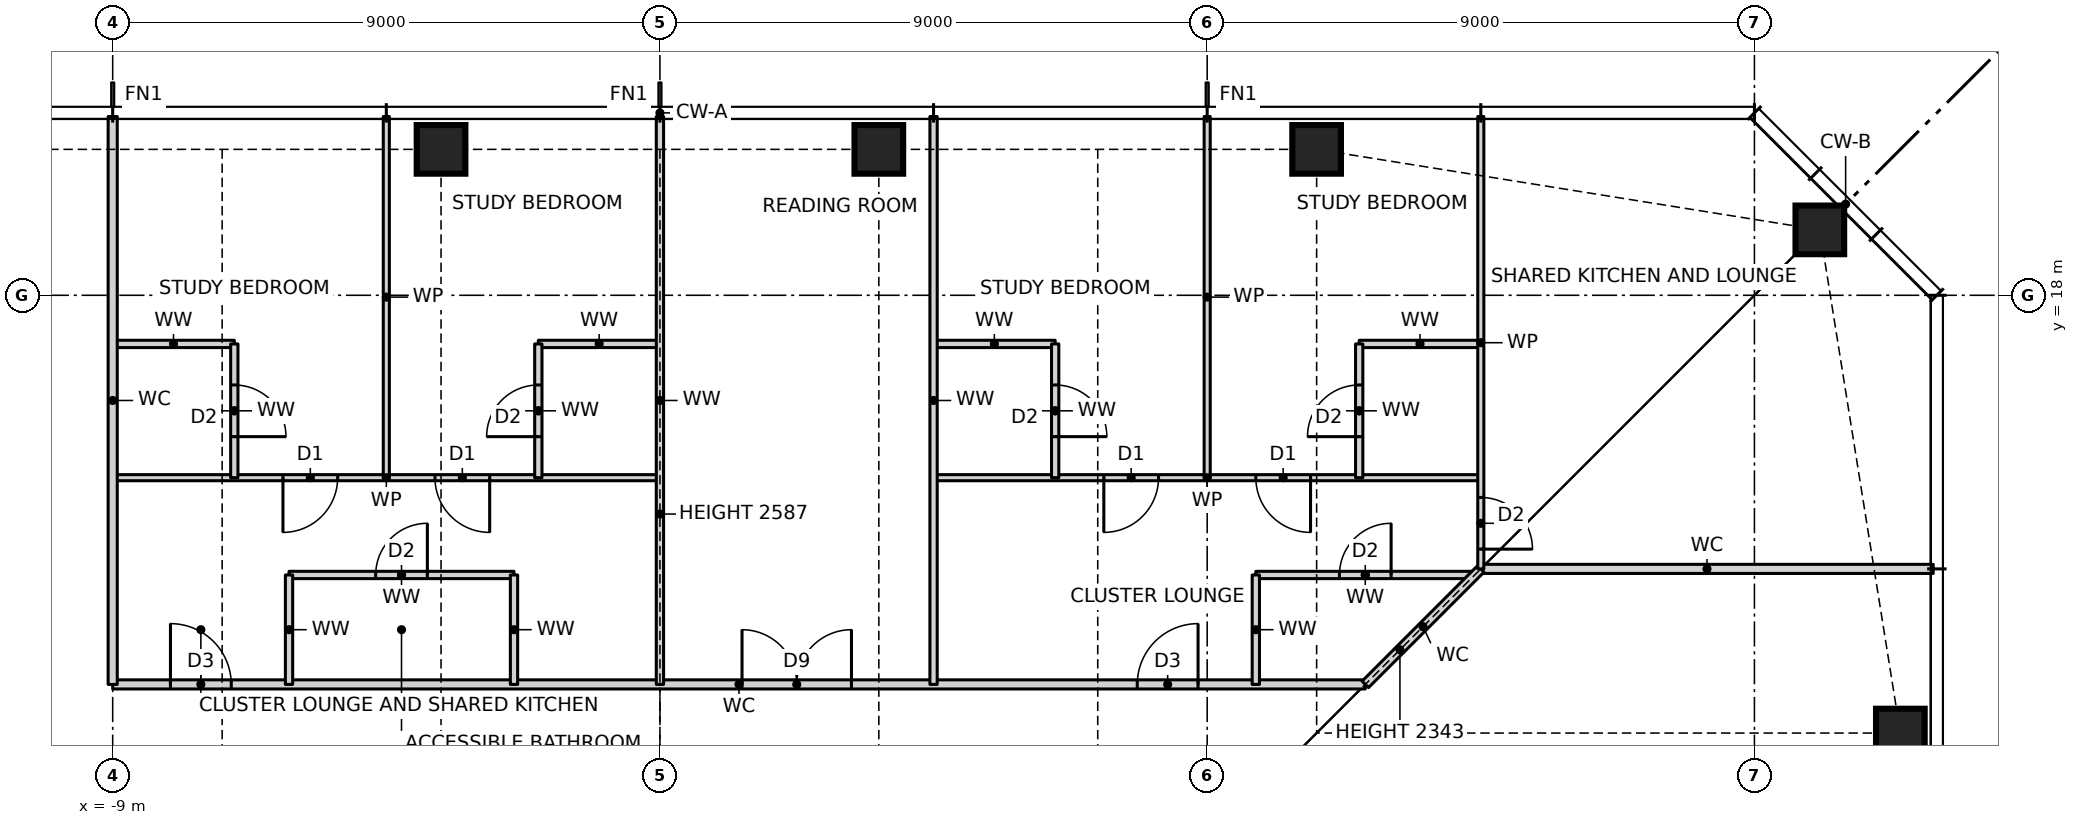
"""IFC4 building model, lengths in metres.
Left out: names, types, materials, properties, quantities, classifications, styles, units other than length and angle.
Written with IfcOpenShell. Run it as: python <this file> out.ifc"""

import sys

from ifc_helpers import new_model, si_unit, direction, frame, frame_2d, origin, origin_2d, place, context, subcontext, project, spatial, rectangle, hollow_rectangle, extrude, element, fill, save


model = new_model("IFC4")
c1 = context("Model", 3, precision=1e-05, world=origin(), true_north=direction((0.0, 1.0)))
c2 = subcontext(c1, "Body", "Model", "MODEL_VIEW")
j1 = project(units=[si_unit("LENGTHUNIT", "METRE"), si_unit("PLANEANGLEUNIT", "RADIAN")], contexts=[c1])
p1 = place(None, origin())
s1 = spatial("IfcSite", under=j1, at=p1, CompositionType="ELEMENT")
p2 = place(p1, origin())
s2 = spatial("IfcBuilding", under=s1, at=p2, CompositionType="ELEMENT")
p3 = place(p2, frame((0.0, 0.0, 112.0)))
s3 = spatial("IfcBuildingStorey", under=s2, at=p3, CompositionType="ELEMENT", Elevation=112.0)
for number, where, z_axis, x_axis in (
    (1, (20.4, 10.8, 0.0), (0.0, 0.0, 1.0), (1.0, 0.0, 0.0)),
    (2, (19.076, 19.076, 0.0), (0.0, 0.0, 1.0), (1.0, 0.0, 0.0)),
    (3, (10.8, 20.4, 0.0), (0.0, 0.0, 1.0), (1.0, 0.0, 0.0)),
    (4, (3.6, 20.4, 0.0), (0.0, 0.0, 1.0), (1.0, 0.0, 0.0)),
    (5, (-3.6, 20.4, 0.0), (0.0, 0.0, 1.0), (1.0, 0.0, 0.0)),
):
    element("IfcColumn", number, at=place(p3, frame(where, z_axis=z_axis, x_axis=x_axis)), inside=s3, PredefinedType="COLUMN", context=c2, shape_type="SweptSolid", body=[
        extrude(hollow_rectangle(XDim=0.8, YDim=0.8, WallThickness=0.07, at=origin_2d()), origin(), (0.0, 0.0, 1.0), 3.5),
    ])
p4 = place(p3, frame((-9.0, 11.6, 0.0), z_axis=(0.0, 0.0, 1.0), x_axis=(1.0, 0.0, 0.0)))
e6 = element("IfcWall", 6, at=p4, inside=s3, PredefinedType="PARTITIONING", context=c2, shape_type="SweptSolid", body=[
    extrude(rectangle(XDim=20.6, YDim=0.15, at=frame_2d((10.3, 0.0))), origin(), (0.0, 0.0, 1.0), 3.27),
])
p5 = place(p4, frame((16.85, 0.0, 0.0)))
e7 = element("IfcOpeningElement", 7, at=p5, cuts=e6, PredefinedType="OPENING", context=c2, shape_type="SweptSolid", body=[
    extrude(rectangle(XDim=1.0, YDim=2.1, at=frame_2d((0.5, 1.05))), frame((0.0, 0.085, 0.0), z_axis=(0.0, -1.0, 0.0), x_axis=(1.0, 0.0, 0.0)), (0.0, 0.0, 1.0), 0.17),
])
p6 = place(p4, frame((10.35, 0.0, 0.0)))
e8 = element("IfcOpeningElement", 8, at=p6, cuts=e6, PredefinedType="OPENING", context=c2, shape_type="SweptSolid", body=[
    extrude(rectangle(XDim=1.8, YDim=2.1, at=frame_2d((0.9, 1.05))), frame((0.0, 0.085, 0.0), z_axis=(0.0, -1.0, 0.0), x_axis=(1.0, 0.0, 0.0)), (0.0, 0.0, 1.0), 0.17),
])
p7 = place(p4, frame((0.95, 0.0, 0.0)))
e9 = element("IfcOpeningElement", 9, at=p7, cuts=e6, PredefinedType="OPENING", context=c2, shape_type="SweptSolid", body=[
    extrude(rectangle(XDim=1.0, YDim=2.1, at=frame_2d((0.5, 1.05))), frame((0.0, 0.085, 0.0), z_axis=(0.0, -1.0, 0.0), x_axis=(1.0, 0.0, 0.0)), (0.0, 0.0, 1.0), 0.17),
])
p8 = place(p3, frame((-6.1, 13.4, 0.0), z_axis=(0.0, 0.0, 1.0), x_axis=(1.0, 0.0, 0.0)))
e10 = element("IfcWall", 10, at=p8, inside=s3, PredefinedType="PARTITIONING", context=c2, shape_type="SweptSolid", body=[
    extrude(rectangle(XDim=3.7, YDim=0.12, at=frame_2d((1.85, 0.0))), origin(), (0.0, 0.0, 1.0), 3.27),
])
p9 = place(p8, frame((1.425, 0.0, 0.0)))
e11 = element("IfcOpeningElement", 11, at=p9, cuts=e10, PredefinedType="OPENING", context=c2, shape_type="SweptSolid", body=[
    extrude(rectangle(XDim=0.85, YDim=2.1, at=frame_2d((0.425, 1.05))), frame((0.0, 0.07, 0.0), z_axis=(0.0, -1.0, 0.0), x_axis=(1.0, 0.0, 0.0)), (0.0, 0.0, 1.0), 0.14),
])
p10 = place(p3, frame((9.8, 13.4, 0.0), z_axis=(0.0, 0.0, 1.0), x_axis=(1.0, 0.0, 0.0)))
e12 = element("IfcWall", 12, at=p10, inside=s3, PredefinedType="PARTITIONING", context=c2, shape_type="SweptSolid", body=[
    extrude(rectangle(XDim=3.6, YDim=0.12, at=frame_2d((1.8, 0.0))), origin(), (0.0, 0.0, 1.0), 3.27),
])
p11 = place(p10, frame((1.375, 0.0, 0.0)))
e13 = element("IfcOpeningElement", 13, at=p11, cuts=e12, PredefinedType="OPENING", context=c2, shape_type="SweptSolid", body=[
    extrude(rectangle(XDim=0.85, YDim=2.1, at=frame_2d((0.425, 1.05))), frame((0.0, 0.07, 0.0), z_axis=(0.0, -1.0, 0.0), x_axis=(1.0, 0.0, 0.0)), (0.0, 0.0, 1.0), 0.14),
])
p12 = place(p3, frame((13.5, 13.5, 0.0), z_axis=(0.0, 0.0, 1.0), x_axis=(1.0, 0.0, 0.0)))
e14 = element("IfcWall", 14, at=p12, inside=s3, PredefinedType="PARTITIONING", context=c2, shape_type="SweptSolid", body=[
    extrude(rectangle(XDim=7.44, YDim=0.15, at=frame_2d((3.72, 0.0))), origin(), (0.0, 0.0, 1.0), 3.27),
])
p13 = place(p3, frame((-9.0, 15.0, 0.0), z_axis=(0.0, 0.0, 1.0), x_axis=(1.0, 0.0, 0.0)))
e15 = element("IfcWall", 15, at=p13, inside=s3, PredefinedType="PARTITIONING", context=c2, shape_type="SweptSolid", body=[
    extrude(rectangle(XDim=9.0, YDim=0.1, at=frame_2d((4.5, 0.0))), origin(), (0.0, 0.0, 1.0), 3.27),
])
p14 = place(p13, frame((5.3, 0.0, 0.0)))
e16 = element("IfcOpeningElement", 16, at=p14, cuts=e15, PredefinedType="OPENING", context=c2, shape_type="SweptSolid", body=[
    extrude(rectangle(XDim=0.9, YDim=2.1, at=frame_2d((0.45, 1.05))), frame((0.0, 0.06, 0.0), z_axis=(0.0, -1.0, 0.0), x_axis=(1.0, 0.0, 0.0)), (0.0, 0.0, 1.0), 0.12),
])
p15 = place(p13, frame((2.8, 0.0, 0.0)))
e17 = element("IfcOpeningElement", 17, at=p15, cuts=e15, PredefinedType="OPENING", context=c2, shape_type="SweptSolid", body=[
    extrude(rectangle(XDim=0.9, YDim=2.1, at=frame_2d((0.45, 1.05))), frame((0.0, 0.06, 0.0), z_axis=(0.0, -1.0, 0.0), x_axis=(1.0, 0.0, 0.0)), (0.0, 0.0, 1.0), 0.12),
])
p16 = place(p3, frame((4.5, 15.0, 0.0), z_axis=(0.0, 0.0, 1.0), x_axis=(1.0, 0.0, 0.0)))
e18 = element("IfcWall", 18, at=p16, inside=s3, PredefinedType="PARTITIONING", context=c2, shape_type="SweptSolid", body=[
    extrude(rectangle(XDim=9.0, YDim=0.1, at=frame_2d((4.5, 0.0))), origin(), (0.0, 0.0, 1.0), 3.27),
])
p17 = place(p16, frame((5.3, 0.0, 0.0)))
e19 = element("IfcOpeningElement", 19, at=p17, cuts=e18, PredefinedType="OPENING", context=c2, shape_type="SweptSolid", body=[
    extrude(rectangle(XDim=0.9, YDim=2.1, at=frame_2d((0.45, 1.05))), frame((0.0, 0.06, 0.0), z_axis=(0.0, -1.0, 0.0), x_axis=(1.0, 0.0, 0.0)), (0.0, 0.0, 1.0), 0.12),
])
p18 = place(p16, frame((2.8, 0.0, 0.0)))
e20 = element("IfcOpeningElement", 20, at=p18, cuts=e18, PredefinedType="OPENING", context=c2, shape_type="SweptSolid", body=[
    extrude(rectangle(XDim=0.9, YDim=2.1, at=frame_2d((0.45, 1.05))), frame((0.0, 0.06, 0.0), z_axis=(0.0, -1.0, 0.0), x_axis=(1.0, 0.0, 0.0)), (0.0, 0.0, 1.0), 0.12),
])
for number, where, z_axis, x_axis in (
    (21, (-9.0, 17.2, 0.0), (0.0, 0.0, 1.0), (1.0, 0.0, 0.0)),
    (22, (-2.0, 17.2, 0.0), (0.0, 0.0, 1.0), (1.0, 0.0, 0.0)),
    (23, (4.5, 17.2, 0.0), (0.0, 0.0, 1.0), (1.0, 0.0, 0.0)),
    (24, (11.5, 17.2, 0.0), (0.0, 0.0, 1.0), (1.0, 0.0, 0.0)),
):
    element("IfcWall", number, at=place(p3, frame(where, z_axis=z_axis, x_axis=x_axis)), inside=s3, PredefinedType="PARTITIONING", context=c2, shape_type="SweptSolid", body=[
        extrude(rectangle(XDim=2.0, YDim=0.12, at=frame_2d((1.0, 0.0))), origin(), (0.0, 0.0, 1.0), 3.27),
    ])
p19 = place(p3, frame((11.6, 11.6, 0.0), z_axis=(0.0, 0.0, 1.0), x_axis=(0.707106781187, 0.707106781187, 0.0)))
e25 = element("IfcWall", 25, at=p19, inside=s3, PredefinedType="PARTITIONING", context=c2, shape_type="SweptSolid", body=[
    extrude(rectangle(XDim=2.687, YDim=0.15, at=frame_2d((1.343, 0.0))), origin(), (0.0, 0.0, 1.0), 2.343),
])
p20 = place(p3, frame((13.5, 13.5, 0.0), z_axis=(0.0, 0.0, 1.0), x_axis=(0.0, 1.0, 0.0)))
e26 = element("IfcWall", 26, at=p20, inside=s3, PredefinedType="PARTITIONING", context=c2, shape_type="SweptSolid", body=[
    extrude(rectangle(XDim=7.44, YDim=0.1, at=frame_2d((3.72, 0.0))), origin(), (0.0, 0.0, 1.0), 3.27),
])
p21 = place(p20, frame((0.325, 0.0, 0.0)))
e27 = element("IfcOpeningElement", 27, at=p21, cuts=e26, PredefinedType="OPENING", context=c2, shape_type="SweptSolid", body=[
    extrude(rectangle(XDim=0.85, YDim=2.1, at=frame_2d((0.425, 1.05))), frame((0.0, 0.06, 0.0), z_axis=(0.0, -1.0, 0.0), x_axis=(1.0, 0.0, 0.0)), (0.0, 0.0, 1.0), 0.12),
])
p22 = place(p3, frame((11.5, 15.0, 0.0), z_axis=(0.0, 0.0, 1.0), x_axis=(0.0, 1.0, 0.0)))
e28 = element("IfcWall", 28, at=p22, inside=s3, PredefinedType="PARTITIONING", context=c2, shape_type="SweptSolid", body=[
    extrude(rectangle(XDim=2.2, YDim=0.12, at=frame_2d((1.1, 0.0))), origin(), (0.0, 0.0, 1.0), 3.27),
])
p23 = place(p22, frame((0.675, 0.0, 0.0)))
e29 = element("IfcOpeningElement", 29, at=p23, cuts=e28, PredefinedType="OPENING", context=c2, shape_type="SweptSolid", body=[
    extrude(rectangle(XDim=0.85, YDim=2.1, at=frame_2d((0.425, 1.05))), frame((0.0, 0.07, 0.0), z_axis=(0.0, -1.0, 0.0), x_axis=(1.0, 0.0, 0.0)), (0.0, 0.0, 1.0), 0.14),
])
p24 = place(p3, frame((9.8, 11.6, 0.0), z_axis=(0.0, 0.0, 1.0), x_axis=(0.0, 1.0, 0.0)))
e30 = element("IfcWall", 30, at=p24, inside=s3, PredefinedType="PARTITIONING", context=c2, shape_type="SweptSolid", body=[
    extrude(rectangle(XDim=1.8, YDim=0.12, at=frame_2d((0.9, 0.0))), origin(), (0.0, 0.0, 1.0), 3.27),
])
p25 = place(p3, frame((9.0, 15.0, 0.0), z_axis=(0.0, 0.0, 1.0), x_axis=(0.0, 1.0, 0.0)))
e31 = element("IfcWall", 31, at=p25, inside=s3, PredefinedType="PARTITIONING", context=c2, shape_type="SweptSolid", body=[
    extrude(rectangle(XDim=5.94, YDim=0.1, at=frame_2d((2.97, 0.0))), origin(), (0.0, 0.0, 1.0), 3.27),
])
p26 = place(p3, frame((6.5, 15.0, 0.0), z_axis=(0.0, 0.0, 1.0), x_axis=(0.0, 1.0, 0.0)))
e32 = element("IfcWall", 32, at=p26, inside=s3, PredefinedType="PARTITIONING", context=c2, shape_type="SweptSolid", body=[
    extrude(rectangle(XDim=2.2, YDim=0.12, at=frame_2d((1.1, 0.0))), origin(), (0.0, 0.0, 1.0), 3.27),
])
p27 = place(p26, frame((0.675, 0.0, 0.0)))
e33 = element("IfcOpeningElement", 33, at=p27, cuts=e32, PredefinedType="OPENING", context=c2, shape_type="SweptSolid", body=[
    extrude(rectangle(XDim=0.85, YDim=2.1, at=frame_2d((0.425, 1.05))), frame((0.0, 0.07, 0.0), z_axis=(0.0, -1.0, 0.0), x_axis=(1.0, 0.0, 0.0)), (0.0, 0.0, 1.0), 0.14),
])
p28 = place(p3, frame((4.5, 11.6, 0.0), z_axis=(0.0, 0.0, 1.0), x_axis=(0.0, 1.0, 0.0)))
e34 = element("IfcWall", 34, at=p28, inside=s3, PredefinedType="PARTITIONING", context=c2, shape_type="SweptSolid", body=[
    extrude(rectangle(XDim=9.34, YDim=0.12, at=frame_2d((4.67, 0.0))), origin(), (0.0, 0.0, 1.0), 3.27),
])
p29 = place(p3, frame((0.0, 11.6, 0.0), z_axis=(0.0, 0.0, 1.0), x_axis=(0.0, 1.0, 0.0)))
e35 = element("IfcWall", 35, at=p29, inside=s3, PredefinedType="PARTITIONING", context=c2, shape_type="SweptSolid", body=[
    extrude(rectangle(XDim=9.34, YDim=0.12, at=frame_2d((4.67, 0.0))), origin(), (0.0, 0.0, 1.0), 2.587),
])
p30 = place(p3, frame((-2.0, 15.0, 0.0), z_axis=(0.0, 0.0, 1.0), x_axis=(0.0, 1.0, 0.0)))
e36 = element("IfcWall", 36, at=p30, inside=s3, PredefinedType="PARTITIONING", context=c2, shape_type="SweptSolid", body=[
    extrude(rectangle(XDim=2.2, YDim=0.12, at=frame_2d((1.1, 0.0))), origin(), (0.0, 0.0, 1.0), 3.27),
])
p31 = place(p30, frame((0.675, 0.0, 0.0)))
e37 = element("IfcOpeningElement", 37, at=p31, cuts=e36, PredefinedType="OPENING", context=c2, shape_type="SweptSolid", body=[
    extrude(rectangle(XDim=0.85, YDim=2.1, at=frame_2d((0.425, 1.05))), frame((0.0, 0.07, 0.0), z_axis=(0.0, -1.0, 0.0), x_axis=(1.0, 0.0, 0.0)), (0.0, 0.0, 1.0), 0.14),
])
p32 = place(p3, frame((-2.4, 11.6, 0.0), z_axis=(0.0, 0.0, 1.0), x_axis=(0.0, 1.0, 0.0)))
e38 = element("IfcWall", 38, at=p32, inside=s3, PredefinedType="PARTITIONING", context=c2, shape_type="SweptSolid", body=[
    extrude(rectangle(XDim=1.8, YDim=0.12, at=frame_2d((0.9, 0.0))), origin(), (0.0, 0.0, 1.0), 3.27),
])
p33 = place(p3, frame((-4.5, 15.0, 0.0), z_axis=(0.0, 0.0, 1.0), x_axis=(0.0, 1.0, 0.0)))
e39 = element("IfcWall", 39, at=p33, inside=s3, PredefinedType="PARTITIONING", context=c2, shape_type="SweptSolid", body=[
    extrude(rectangle(XDim=5.94, YDim=0.1, at=frame_2d((2.97, 0.0))), origin(), (0.0, 0.0, 1.0), 3.27),
])
p34 = place(p3, frame((-6.1, 11.6, 0.0), z_axis=(0.0, 0.0, 1.0), x_axis=(0.0, 1.0, 0.0)))
e40 = element("IfcWall", 40, at=p34, inside=s3, PredefinedType="PARTITIONING", context=c2, shape_type="SweptSolid", body=[
    extrude(rectangle(XDim=1.8, YDim=0.12, at=frame_2d((0.9, 0.0))), origin(), (0.0, 0.0, 1.0), 3.27),
])
p35 = place(p3, frame((-7.0, 15.0, 0.0), z_axis=(0.0, 0.0, 1.0), x_axis=(0.0, 1.0, 0.0)))
e41 = element("IfcWall", 41, at=p35, inside=s3, PredefinedType="PARTITIONING", context=c2, shape_type="SweptSolid", body=[
    extrude(rectangle(XDim=2.2, YDim=0.12, at=frame_2d((1.1, 0.0))), origin(), (0.0, 0.0, 1.0), 3.27),
])
p36 = place(p35, frame((0.675, 0.0, 0.0)))
e42 = element("IfcOpeningElement", 42, at=p36, cuts=e41, PredefinedType="OPENING", context=c2, shape_type="SweptSolid", body=[
    extrude(rectangle(XDim=0.85, YDim=2.1, at=frame_2d((0.425, 1.05))), frame((0.0, 0.07, 0.0), z_axis=(0.0, -1.0, 0.0), x_axis=(1.0, 0.0, 0.0)), (0.0, 0.0, 1.0), 0.14),
])
p37 = place(p3, frame((-9.0, 11.6, 0.0), z_axis=(0.0, 0.0, 1.0), x_axis=(0.0, 1.0, 0.0)))
e43 = element("IfcWall", 43, at=p37, inside=s3, PredefinedType="PARTITIONING", context=c2, shape_type="SweptSolid", body=[
    extrude(rectangle(XDim=9.34, YDim=0.15, at=frame_2d((4.67, 0.0))), origin(), (0.0, 0.0, 1.0), 3.27),
])
p38 = place(p23, origin())
e44 = element("IfcDoor", 44, at=p38, inside=s3, OperationType="SINGLE_SWING_LEFT", PredefinedType="DOOR", context=c2, shape_type="SweptSolid", body=[
    extrude(rectangle(XDim=0.85, YDim=2.1, at=frame_2d((0.425, 1.05))), frame((0.0, 0.025, 0.0), z_axis=(0.0, -1.0, 0.0), x_axis=(1.0, 0.0, 0.0)), (0.0, 0.0, 1.0), 0.05),
])
fill(e29, e44)
p39 = place(p17, frame((0.9, 0.0, 0.0), z_axis=(0.0, 0.0, 1.0), x_axis=(-1.0, 0.0, 0.0)))
e45 = element("IfcDoor", 45, at=p39, inside=s3, OperationType="SINGLE_SWING_LEFT", PredefinedType="DOOR", context=c2, shape_type="SweptSolid", body=[
    extrude(rectangle(XDim=0.9, YDim=2.1, at=frame_2d((0.45, 1.05))), frame((0.0, 0.025, 0.0), z_axis=(0.0, -1.0, 0.0), x_axis=(1.0, 0.0, 0.0)), (0.0, 0.0, 1.0), 0.05),
])
fill(e19, e45)
p40 = place(p27, frame((0.85, 0.0, 0.0), z_axis=(0.0, 0.0, 1.0), x_axis=(-1.0, 0.0, 0.0)))
e46 = element("IfcDoor", 46, at=p40, inside=s3, OperationType="SINGLE_SWING_RIGHT", PredefinedType="DOOR", context=c2, shape_type="SweptSolid", body=[
    extrude(rectangle(XDim=0.85, YDim=2.1, at=frame_2d((0.425, 1.05))), frame((0.0, 0.025, 0.0), z_axis=(0.0, -1.0, 0.0), x_axis=(1.0, 0.0, 0.0)), (0.0, 0.0, 1.0), 0.05),
])
fill(e33, e46)
p41 = place(p18, frame((0.9, 0.0, 0.0), z_axis=(0.0, 0.0, 1.0), x_axis=(-1.0, 0.0, 0.0)))
e47 = element("IfcDoor", 47, at=p41, inside=s3, OperationType="SINGLE_SWING_RIGHT", PredefinedType="DOOR", context=c2, shape_type="SweptSolid", body=[
    extrude(rectangle(XDim=0.9, YDim=2.1, at=frame_2d((0.45, 1.05))), frame((0.0, 0.025, 0.0), z_axis=(0.0, -1.0, 0.0), x_axis=(1.0, 0.0, 0.0)), (0.0, 0.0, 1.0), 0.05),
])
fill(e20, e47)
p42 = place(p5, origin())
e48 = element("IfcDoor", 48, at=p42, inside=s3, OperationType="SINGLE_SWING_RIGHT", PredefinedType="DOOR", context=c2, shape_type="SweptSolid", body=[
    extrude(rectangle(XDim=1.0, YDim=2.1, at=frame_2d((0.5, 1.05))), frame((0.0, 0.025, 0.0), z_axis=(0.0, -1.0, 0.0), x_axis=(1.0, 0.0, 0.0)), (0.0, 0.0, 1.0), 0.05),
])
fill(e7, e48)
p43 = place(p11, origin())
e49 = element("IfcDoor", 49, at=p43, inside=s3, OperationType="SINGLE_SWING_RIGHT", PredefinedType="DOOR", context=c2, shape_type="SweptSolid", body=[
    extrude(rectangle(XDim=0.85, YDim=2.1, at=frame_2d((0.425, 1.05))), frame((0.0, 0.025, 0.0), z_axis=(0.0, -1.0, 0.0), x_axis=(1.0, 0.0, 0.0)), (0.0, 0.0, 1.0), 0.05),
])
fill(e13, e49)
p44 = place(p6, origin())
e50 = element("IfcDoor", 50, at=p44, inside=s3, OperationType="DOUBLE_DOOR_SINGLE_SWING", PredefinedType="DOOR", context=c2, shape_type="SweptSolid", body=[
    extrude(rectangle(XDim=1.8, YDim=2.1, at=frame_2d((0.9, 1.05))), frame((0.0, 0.025, 0.0), z_axis=(0.0, -1.0, 0.0), x_axis=(1.0, 0.0, 0.0)), (0.0, 0.0, 1.0), 0.05),
])
fill(e8, e50)
p45 = place(p31, origin())
e51 = element("IfcDoor", 51, at=p45, inside=s3, OperationType="SINGLE_SWING_LEFT", PredefinedType="DOOR", context=c2, shape_type="SweptSolid", body=[
    extrude(rectangle(XDim=0.85, YDim=2.1, at=frame_2d((0.425, 1.05))), frame((0.0, 0.025, 0.0), z_axis=(0.0, -1.0, 0.0), x_axis=(1.0, 0.0, 0.0)), (0.0, 0.0, 1.0), 0.05),
])
fill(e37, e51)
p46 = place(p14, frame((0.9, 0.0, 0.0), z_axis=(0.0, 0.0, 1.0), x_axis=(-1.0, 0.0, 0.0)))
e52 = element("IfcDoor", 52, at=p46, inside=s3, OperationType="SINGLE_SWING_LEFT", PredefinedType="DOOR", context=c2, shape_type="SweptSolid", body=[
    extrude(rectangle(XDim=0.9, YDim=2.1, at=frame_2d((0.45, 1.05))), frame((0.0, 0.025, 0.0), z_axis=(0.0, -1.0, 0.0), x_axis=(1.0, 0.0, 0.0)), (0.0, 0.0, 1.0), 0.05),
])
fill(e16, e52)
p47 = place(p36, frame((0.85, 0.0, 0.0), z_axis=(0.0, 0.0, 1.0), x_axis=(-1.0, 0.0, 0.0)))
e53 = element("IfcDoor", 53, at=p47, inside=s3, OperationType="SINGLE_SWING_RIGHT", PredefinedType="DOOR", context=c2, shape_type="SweptSolid", body=[
    extrude(rectangle(XDim=0.85, YDim=2.1, at=frame_2d((0.425, 1.05))), frame((0.0, 0.025, 0.0), z_axis=(0.0, -1.0, 0.0), x_axis=(1.0, 0.0, 0.0)), (0.0, 0.0, 1.0), 0.05),
])
fill(e42, e53)
p48 = place(p15, frame((0.9, 0.0, 0.0), z_axis=(0.0, 0.0, 1.0), x_axis=(-1.0, 0.0, 0.0)))
e54 = element("IfcDoor", 54, at=p48, inside=s3, OperationType="SINGLE_SWING_RIGHT", PredefinedType="DOOR", context=c2, shape_type="SweptSolid", body=[
    extrude(rectangle(XDim=0.9, YDim=2.1, at=frame_2d((0.45, 1.05))), frame((0.0, 0.025, 0.0), z_axis=(0.0, -1.0, 0.0), x_axis=(1.0, 0.0, 0.0)), (0.0, 0.0, 1.0), 0.05),
])
fill(e17, e54)
p49 = place(p7, origin())
e55 = element("IfcDoor", 55, at=p49, inside=s3, OperationType="SINGLE_SWING_LEFT", PredefinedType="DOOR", context=c2, shape_type="SweptSolid", body=[
    extrude(rectangle(XDim=1.0, YDim=2.1, at=frame_2d((0.5, 1.05))), frame((0.0, 0.025, 0.0), z_axis=(0.0, -1.0, 0.0), x_axis=(1.0, 0.0, 0.0)), (0.0, 0.0, 1.0), 0.05),
])
fill(e9, e55)
p50 = place(p9, origin())
e56 = element("IfcDoor", 56, at=p50, inside=s3, OperationType="SINGLE_SWING_RIGHT", PredefinedType="DOOR", context=c2, shape_type="SweptSolid", body=[
    extrude(rectangle(XDim=0.85, YDim=2.1, at=frame_2d((0.425, 1.05))), frame((0.0, 0.025, 0.0), z_axis=(0.0, -1.0, 0.0), x_axis=(1.0, 0.0, 0.0)), (0.0, 0.0, 1.0), 0.05),
])
fill(e11, e56)
p51 = place(p21, frame((0.85, 0.0, 0.0), z_axis=(0.0, 0.0, 1.0), x_axis=(-1.0, 0.0, 0.0)))
e57 = element("IfcDoor", 57, at=p51, inside=s3, OperationType="SINGLE_SWING_RIGHT", PredefinedType="DOOR", context=c2, shape_type="SweptSolid", body=[
    extrude(rectangle(XDim=0.85, YDim=2.1, at=frame_2d((0.425, 1.05))), frame((0.0, 0.025, 0.0), z_axis=(0.0, -1.0, 0.0), x_axis=(1.0, 0.0, 0.0)), (0.0, 0.0, 1.0), 0.05),
])
fill(e27, e57)
save(model, sys.argv[1])
